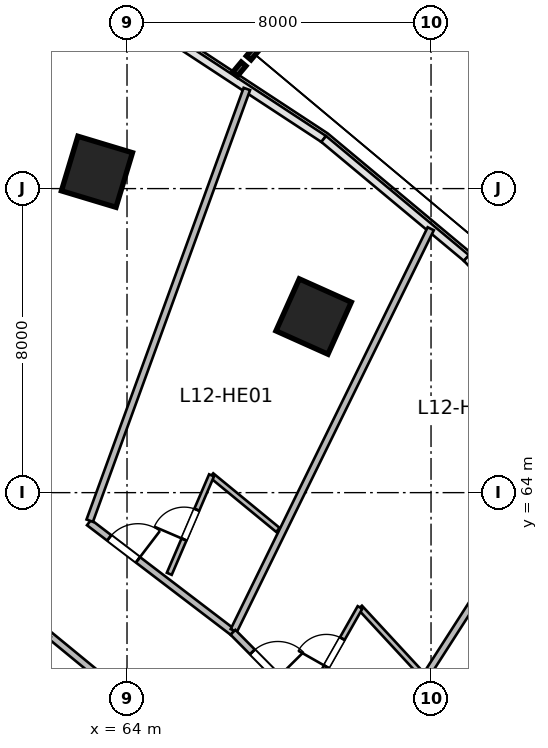
"""IFC4 building model, lengths in metres.
Left out: names, types, materials, properties, quantities, classifications, styles, units other than length and angle.
Written with IfcOpenShell. Run it as: python <this file> out.ifc"""

import sys

from ifc_helpers import new_model, si_unit, direction, frame, frame_2d, origin, origin_2d, place, context, subcontext, project, spatial, rectangle, extrude, source, transform, mapped, element, fill, save


model = new_model("IFC4")
c1 = context("Model", 3, precision=1e-05, world=origin(), true_north=direction((0.0, 1.0)))
c2 = subcontext(c1, "Body", "Model", "MODEL_VIEW")
j1 = project(units=[si_unit("LENGTHUNIT", "METRE"), si_unit("PLANEANGLEUNIT", "RADIAN")], contexts=[c1])
p1 = place(None, origin())
s1 = spatial("IfcSite", under=j1, at=p1, CompositionType="ELEMENT")
p2 = place(p1, origin())
s2 = spatial("IfcBuilding", under=s1, at=p2, CompositionType="ELEMENT")
p3 = place(p2, frame((0.0, 0.0, 57.0)))
s3 = spatial("IfcBuildingStorey", under=s2, at=p3, CompositionType="ELEMENT", Elevation=57.0)
m1 = source(origin(), c2, "Body", "SweptSolid", [
    extrude(rectangle(XDim=1.5, YDim=1.5, at=origin_2d()), origin(), (0.0, 0.0, 1.0), 3.6),
])
for number, where, z_axis, x_axis in (
    (1, (63.209, 72.442, 0.0), (0.0, 0.0, 1.0), (0.289, 0.957, 0.0)),
    (2, (68.91, 68.633, 0.0), (0.0, 0.0, 1.0), (0.409, 0.912, 0.0)),
):
    element("IfcColumn", number, at=place(p3, frame(where, z_axis=z_axis, x_axis=x_axis)), inside=s3, PredefinedType="COLUMN", context=c2, shape_type="MappedRepresentation", body=[
        mapped(m1, transform((0.0, 0.0, 0.0), scale=1.0)),
    ])
m2 = source(origin(), c2, "Body", "SweptSolid", [
    extrude(rectangle(XDim=4.762, YDim=0.18, at=frame_2d((2.381, 0.0))), origin(), (0.0, 0.0, 1.0), 3.36),
])
p4 = place(p3, frame((63.001, 63.214, 0.0), z_axis=(0.0, 0.0, 1.0), x_axis=(0.795070295872, -0.60651729128, 0.0)))
e3 = element("IfcWall", 3, at=p4, inside=s3, PredefinedType="PLUMBINGWALL", context=c2, shape_type="MappedRepresentation", body=[
    mapped(m2, transform((0.0, 0.0, 0.0), scale=1.0)),
])
p5 = place(p4, frame((0.668, 0.0, 0.0)))
e4 = element("IfcOpeningElement", 4, at=p5, cuts=e3, PredefinedType="OPENING", context=c2, shape_type="SweptSolid", body=[
    extrude(rectangle(XDim=0.95, YDim=2.15, at=frame_2d((0.475, 1.075))), frame((0.0, 0.1, 0.0), z_axis=(0.0, -1.0, 0.0), x_axis=(1.0, 0.0, 0.0)), (0.0, 0.0, 1.0), 0.2),
])
m3 = source(origin(), c2, "Body", "SweptSolid", [
    extrude(rectangle(XDim=12.088, YDim=0.18, at=frame_2d((6.044, 0.0))), origin(), (0.0, 0.0, 1.0), 3.36),
])
p6 = place(p3, frame((63.019, 63.262, 0.0), z_axis=(0.0, 0.0, 1.0), x_axis=(0.34203007529, 0.939689005787, 0.0)))
e5 = element("IfcWall", 5, at=p6, inside=s3, PredefinedType="PLUMBINGWALL", context=c2, shape_type="MappedRepresentation", body=[
    mapped(m3, transform((0.0, 0.0, 0.0), scale=1.0)),
])
m4 = source(origin(), c2, "Body", "SweptSolid", [
    extrude(rectangle(XDim=11.775, YDim=0.18, at=frame_2d((5.887, 0.0))), origin(), (0.0, 0.0, 1.0), 3.36),
])
p7 = place(p3, frame((66.81, 60.371, 0.0), z_axis=(0.0, 0.0, 1.0), x_axis=(0.4401500056, 0.897924257702, 0.0)))
e6 = element("IfcWall", 6, at=p7, inside=s3, PredefinedType="PLUMBINGWALL", context=c2, shape_type="MappedRepresentation", body=[
    mapped(m4, transform((0.0, 0.0, 0.0), scale=1.0)),
])
m5 = source(origin(), c2, "Body", "SweptSolid", [
    extrude(rectangle(XDim=2.26, YDim=0.14, at=frame_2d((1.13, 0.0))), origin(), (0.0, 0.0, 1.0), 3.36),
])
p8 = place(p3, frame((66.224, 64.455, 0.0), z_axis=(0.0, 0.0, 1.0), x_axis=(0.772646789219, -0.634836151388, 0.0)))
e7 = element("IfcWall", 7, at=p8, inside=s3, PredefinedType="PARTITIONING", context=c2, shape_type="MappedRepresentation", body=[
    mapped(m5, transform((0.0, 0.0, 0.0), scale=1.0)),
])
m6 = source(origin(), c2, "Body", "SweptSolid", [
    extrude(rectangle(XDim=2.819, YDim=0.14, at=frame_2d((1.409, 0.0))), origin(), (0.0, 0.0, 1.0), 3.36),
])
p9 = place(p3, frame((65.112, 61.864, 0.0), z_axis=(0.0, 0.0, 1.0), x_axis=(0.394420979357, 0.918929861874, 0.0)))
e8 = element("IfcWall", 8, at=p9, inside=s3, PredefinedType="PARTITIONING", context=c2, shape_type="MappedRepresentation", body=[
    mapped(m6, transform((0.0, 0.0, 0.0), scale=1.0)),
])
p10 = place(p9, frame((0.984, 0.0, 0.0)))
e9 = element("IfcOpeningElement", 9, at=p10, cuts=e8, PredefinedType="OPENING", context=c2, shape_type="SweptSolid", body=[
    extrude(rectangle(XDim=0.85, YDim=2.05, at=frame_2d((0.425, 1.025))), frame((0.0, 0.08, 0.0), z_axis=(0.0, -1.0, 0.0), x_axis=(1.0, 0.0, 0.0)), (0.0, 0.0, 1.0), 0.16),
])
m7 = source(origin(), c2, "Body", "SweptSolid", [
    extrude(rectangle(XDim=5.012, YDim=0.18, at=frame_2d((2.506, 0.0))), origin(), (0.0, 0.0, 1.0), 3.36),
])
p11 = place(p3, frame((66.788, 60.326, 0.0), z_axis=(0.0, 0.0, 1.0), x_axis=(0.703664626435, -0.710532260707, 0.0)))
e10 = element("IfcWall", 10, at=p11, inside=s3, PredefinedType="PLUMBINGWALL", context=c2, shape_type="MappedRepresentation", body=[
    mapped(m7, transform((0.0, 0.0, 0.0), scale=1.0)),
])
p12 = place(p11, frame((0.728, 0.0, 0.0)))
e11 = element("IfcOpeningElement", 11, at=p12, cuts=e10, PredefinedType="OPENING", context=c2, shape_type="SweptSolid", body=[
    extrude(rectangle(XDim=0.95, YDim=2.15, at=frame_2d((0.475, 1.075))), frame((0.0, 0.1, 0.0), z_axis=(0.0, -1.0, 0.0), x_axis=(1.0, 0.0, 0.0)), (0.0, 0.0, 1.0), 0.2),
])
m8 = source(origin(), c2, "Body", "SweptSolid", [
    extrude(rectangle(XDim=11.432, YDim=0.18, at=frame_2d((5.716, 0.0))), origin(), (0.0, 0.0, 1.0), 3.36),
])
p13 = place(p3, frame((70.341, 56.805, 0.0), z_axis=(0.0, 0.0, 1.0), x_axis=(0.540196183124, 0.841539115988, 0.0)))
e12 = element("IfcWall", 12, at=p13, inside=s3, PredefinedType="PLUMBINGWALL", context=c2, shape_type="MappedRepresentation", body=[
    mapped(m8, transform((0.0, 0.0, 0.0), scale=1.0)),
])
m9 = source(origin(), c2, "Body", "SweptSolid", [
    extrude(rectangle(XDim=2.38, YDim=0.14, at=frame_2d((1.19, 0.0))), origin(), (0.0, 0.0, 1.0), 3.36),
])
p14 = place(p3, frame((70.131, 60.979, 0.0), z_axis=(0.0, 0.0, 1.0), x_axis=(0.679084816758, -0.734059814762, 0.0)))
e13 = element("IfcWall", 13, at=p14, inside=s3, PredefinedType="PARTITIONING", context=c2, shape_type="MappedRepresentation", body=[
    mapped(m9, transform((0.0, 0.0, 0.0), scale=1.0)),
])
m10 = source(origin(), c2, "Body", "SweptSolid", [
    extrude(rectangle(XDim=2.735, YDim=0.14, at=frame_2d((1.367, 0.0))), origin(), (0.0, 0.0, 1.0), 3.36),
])
p15 = place(p3, frame((68.781, 58.6, 0.0), z_axis=(0.0, 0.0, 1.0), x_axis=(0.493694940578, 0.869635156631, 0.0)))
e14 = element("IfcWall", 14, at=p15, inside=s3, PredefinedType="PARTITIONING", context=c2, shape_type="MappedRepresentation", body=[
    mapped(m10, transform((0.0, 0.0, 0.0), scale=1.0)),
])
p16 = place(p15, frame((0.942, 0.0, 0.0)))
e15 = element("IfcOpeningElement", 15, at=p16, cuts=e14, PredefinedType="OPENING", context=c2, shape_type="SweptSolid", body=[
    extrude(rectangle(XDim=0.85, YDim=2.05, at=frame_2d((0.425, 1.025))), frame((0.0, 0.08, 0.0), z_axis=(0.0, -1.0, 0.0), x_axis=(1.0, 0.0, 0.0)), (0.0, 0.0, 1.0), 0.16),
])
m11 = source(origin(), c2, "Body", "SweptSolid", [
    extrude(rectangle(XDim=6.721, YDim=0.18, at=frame_2d((3.361, 0.0))), origin(), (0.0, 0.0, 1.0), 3.36),
])
p17 = place(p3, frame((61.931, 60.275, 0.0), z_axis=(0.0, 0.0, 1.0), x_axis=(0.772828051199, -0.63461547671, 0.0)))
e16 = element("IfcWall", 16, at=p17, inside=s3, PredefinedType="PLUMBINGWALL", context=c2, shape_type="MappedRepresentation", body=[
    mapped(m11, transform((0.0, 0.0, 0.0), scale=1.0)),
])
p18 = place(p17, frame((2.885, 0.0, 0.0)))
e17 = element("IfcOpeningElement", 17, at=p18, cuts=e16, PredefinedType="OPENING", context=c2, shape_type="SweptSolid", body=[
    extrude(rectangle(XDim=0.95, YDim=2.15, at=frame_2d((0.475, 1.075))), frame((0.0, 0.1, 0.0), z_axis=(0.0, -1.0, 0.0), x_axis=(1.0, 0.0, 0.0)), (0.0, 0.0, 1.0), 0.2),
])
m12 = source(origin(), c2, "Body", "SweptSolid", [
    extrude(rectangle(XDim=0.95, YDim=2.15, at=frame_2d((0.475, 1.075))), frame((0.0, 0.025, 0.0), z_axis=(0.0, -1.0, 0.0), x_axis=(1.0, 0.0, 0.0)), (0.0, 0.0, 1.0), 0.05),
])
p19 = place(p5, origin())
e18 = element("IfcDoor", 18, at=p19, inside=s3, OperationType="SINGLE_SWING_RIGHT", PredefinedType="DOOR", context=c2, shape_type="MappedRepresentation", body=[
    mapped(m12, transform((0.0, 0.0, 0.0), scale=1.0)),
])
fill(e4, e18)
m13 = source(origin(), c2, "Body", "SweptSolid", [
    extrude(rectangle(XDim=0.85, YDim=2.05, at=frame_2d((0.425, 1.025))), frame((0.0, 0.025, 0.0), z_axis=(0.0, -1.0, 0.0), x_axis=(1.0, 0.0, 0.0)), (0.0, 0.0, 1.0), 0.05),
])
p20 = place(p10, origin())
e19 = element("IfcDoor", 19, at=p20, inside=s3, OperationType="SINGLE_SWING_LEFT", PredefinedType="DOOR", context=c2, shape_type="MappedRepresentation", body=[
    mapped(m13, transform((0.0, 0.0, 0.0), scale=1.0)),
])
fill(e9, e19)
p21 = place(p12, origin())
e20 = element("IfcDoor", 20, at=p21, inside=s3, OperationType="SINGLE_SWING_RIGHT", PredefinedType="DOOR", context=c2, shape_type="MappedRepresentation", body=[
    mapped(m12, transform((0.0, 0.0, 0.0), scale=1.0)),
])
fill(e11, e20)
p22 = place(p16, origin())
e21 = element("IfcDoor", 21, at=p22, inside=s3, OperationType="SINGLE_SWING_LEFT", PredefinedType="DOOR", context=c2, shape_type="MappedRepresentation", body=[
    mapped(m13, transform((0.0, 0.0, 0.0), scale=1.0)),
])
fill(e15, e21)
save(model, sys.argv[1])
